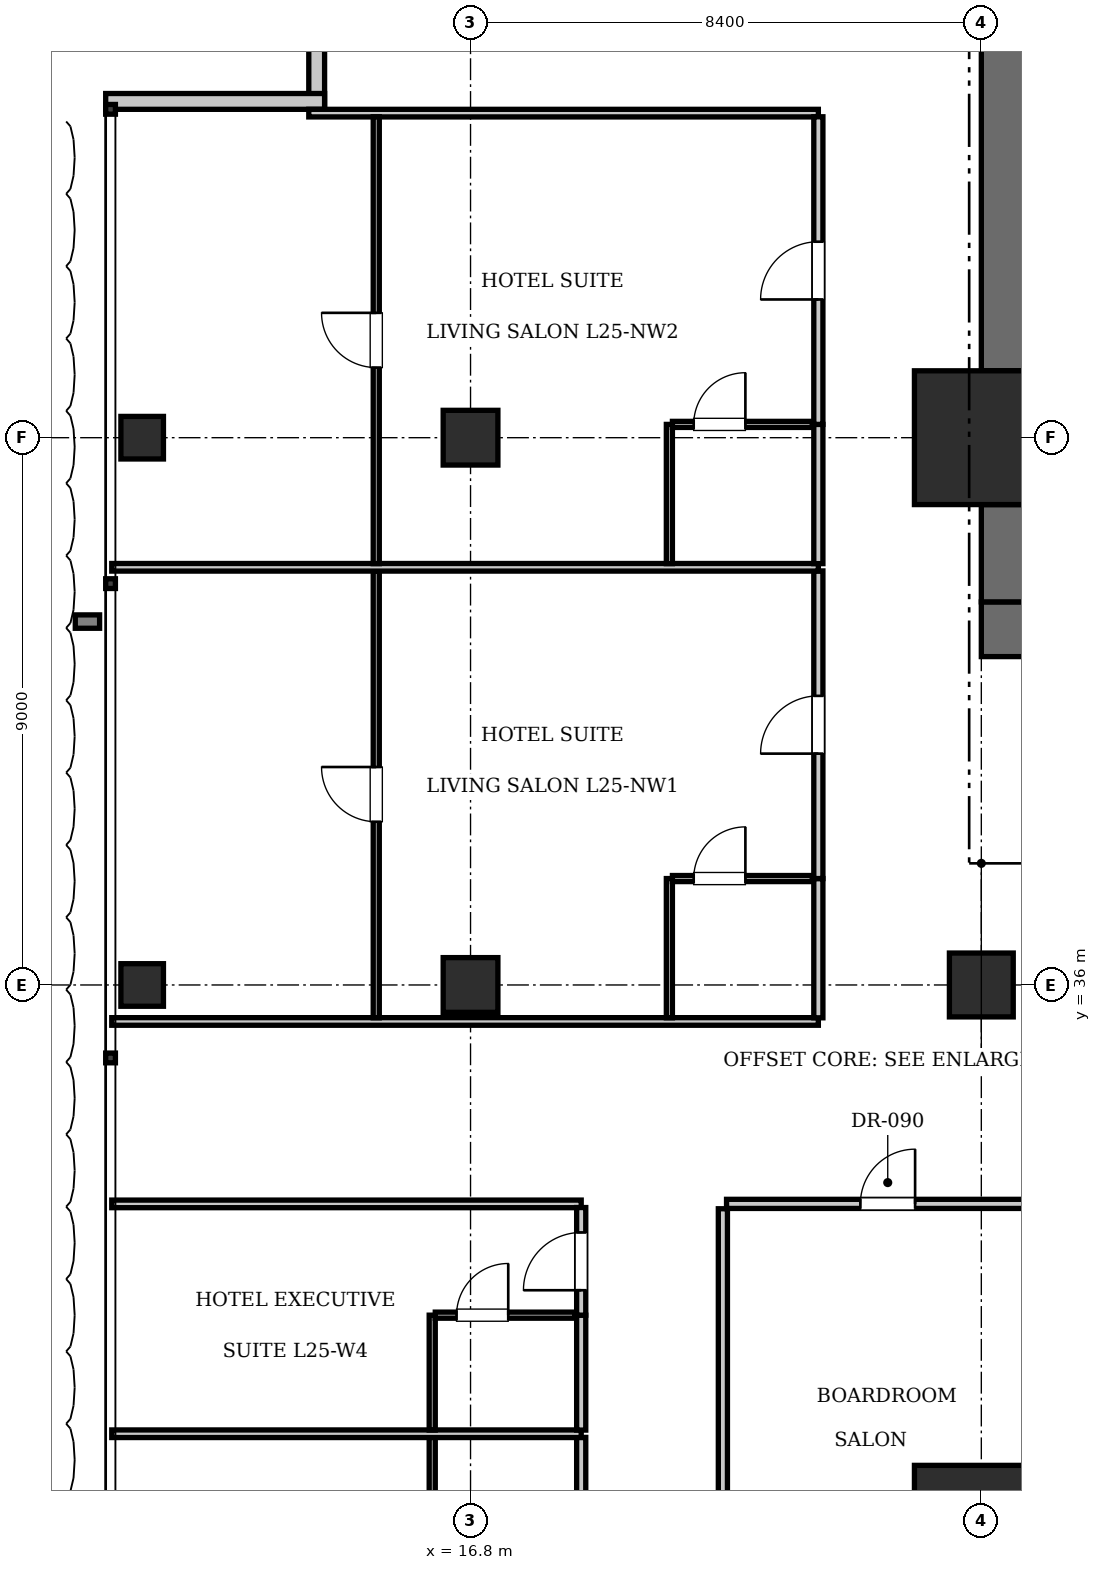
"""IFC4 building model, lengths in metres.
Left out: names, types, materials, properties, quantities, classifications, styles, units other than length and angle.
Written with IfcOpenShell. Run it as: python <this file> out.ifc"""

import sys

from ifc_helpers import new_model, si_unit, direction, frame, frame_2d, origin, origin_2d, place, context, subcontext, project, spatial, rectangle, i_section, extrude, element, fill, save


model = new_model("IFC4")
c1 = context("Model", 3, precision=1e-05, world=origin(), true_north=direction((0.0, 1.0)))
c2 = subcontext(c1, "Body", "Model", "MODEL_VIEW")
j1 = project(units=[si_unit("LENGTHUNIT", "METRE"), si_unit("PLANEANGLEUNIT", "RADIAN")], contexts=[c1])
p1 = place(None, origin())
s1 = spatial("IfcSite", under=j1, at=p1, CompositionType="ELEMENT")
p2 = place(p1, origin())
s2 = spatial("IfcBuilding", under=s1, at=p2, CompositionType="ELEMENT")
p3 = place(p2, frame((0.0, 0.0, 103.95)))
s3 = spatial("IfcBuildingStorey", under=s2, at=p3, CompositionType="ELEMENT", Elevation=103.95)
for number, where, z_axis, x_axis in (
    (1, (25.2, 27.0, 0.0), (0.0, 0.0, 1.0), (1.0, 0.0, 0.0)),
    (2, (25.2, 45.0, 0.0), (0.0, 0.0, 1.0), (1.0, 0.0, 0.0)),
):
    element("IfcColumn", number, at=place(p3, frame(where, z_axis=z_axis, x_axis=x_axis)), inside=s3, PredefinedType="COLUMN", context=c2, shape_type="SweptSolid", body=[
        extrude(rectangle(XDim=2.2, YDim=2.2, at=origin_2d()), origin(), (0.0, 0.0, 1.0), 3.85),
    ])
p4 = place(p3, frame((25.2, 41.85, 0.0), z_axis=(0.0, 0.0, 1.0), x_axis=(1.0, 0.0, 0.0)))
e3 = element("IfcWall", 3, at=p4, inside=s3, PredefinedType="SHEAR", context=c2, shape_type="SweptSolid", body=[
    extrude(rectangle(XDim=6.8, YDim=0.9, at=frame_2d((3.4, 0.0))), origin(), (0.0, 0.0, 1.0), 3.85),
])
p5 = place(p4, frame((1.65, 0.0, 0.0)))
e4 = element("IfcOpeningElement", 4, at=p5, cuts=e3, PredefinedType="OPENING", context=c2, shape_type="SweptSolid", body=[
    extrude(rectangle(XDim=1.15, YDim=2.15, at=frame_2d((0.575, 1.075))), frame((0.0, 0.46, 0.0), z_axis=(0.0, -1.0, 0.0), x_axis=(1.0, 0.0, 0.0)), (0.0, 0.0, 1.0), 0.92),
])
p6 = place(p4, frame((5.15, 0.0, 0.0)))
e5 = element("IfcOpeningElement", 5, at=p6, cuts=e3, PredefinedType="OPENING", context=c2, shape_type="SweptSolid", body=[
    extrude(rectangle(XDim=1.1, YDim=2.2, at=frame_2d((0.55, 1.1))), frame((0.0, 0.46, 0.0), z_axis=(0.0, -1.0, 0.0), x_axis=(1.0, 0.0, 0.0)), (0.0, 0.0, 1.0), 0.92),
])
p7 = place(p3, frame((25.65, 42.3, 0.0), z_axis=(0.0, 0.0, 1.0), x_axis=(0.0, 1.0, 0.0)))
e6 = element("IfcWall", 6, at=p7, inside=s3, PredefinedType="SHEAR", context=c2, shape_type="SweptSolid", body=[
    extrude(rectangle(XDim=1.6, YDim=0.9, at=frame_2d((0.8, 0.0))), origin(), (0.0, 0.0, 1.0), 3.85),
])
p8 = place(p3, frame((25.65, 46.1, 0.0), z_axis=(0.0, 0.0, 1.0), x_axis=(0.0, 1.0, 0.0)))
e7 = element("IfcWall", 7, at=p8, inside=s3, PredefinedType="SHEAR", context=c2, shape_type="SweptSolid", body=[
    extrude(rectangle(XDim=7.0, YDim=0.9, at=frame_2d((3.5, 0.0))), origin(), (0.0, 0.0, 1.0), 3.85),
])
p9 = place(p3, frame((25.2, 36.0, 0.0), z_axis=(0.0, 0.0, 1.0), x_axis=(1.0, 0.0, 0.0)))
e8 = element("IfcColumn", 8, at=p9, inside=s3, PredefinedType="COLUMN", context=c2, shape_type="SweptSolid", body=[
    extrude(rectangle(XDim=1.05, YDim=1.05, at=origin_2d()), origin(), (0.0, 0.0, 1.0), 3.85),
])
for number, where, z_axis, x_axis in (
    (9, (16.8, 36.0, 0.0), (0.0, 0.0, 1.0), (1.0, 0.0, 0.0)),
    (10, (16.8, 45.0, 0.0), (0.0, 0.0, 1.0), (1.0, 0.0, 0.0)),
):
    element("IfcColumn", number, at=place(p3, frame(where, z_axis=z_axis, x_axis=x_axis)), inside=s3, PredefinedType="COLUMN", context=c2, shape_type="SweptSolid", body=[
        extrude(rectangle(XDim=0.9, YDim=0.9, at=origin_2d()), origin(), (0.0, 0.0, 1.0), 3.85),
    ])
for number, where, z_axis, x_axis in (
    (11, (11.4, 36.0, 0.0), (0.0, 0.0, 1.0), (1.0, 0.0, 0.0)),
    (12, (11.4, 45.0, 0.0), (0.0, 0.0, 1.0), (1.0, 0.0, 0.0)),
):
    element("IfcColumn", number, at=place(p3, frame(where, z_axis=z_axis, x_axis=x_axis)), inside=s3, PredefinedType="COLUMN", context=c2, shape_type="SweptSolid", body=[
        extrude(i_section(OverallWidth=0.7, OverallDepth=0.7, WebThickness=0.028, FlangeThickness=0.044, at=origin_2d()), origin(), (0.0, 0.0, 1.0), 3.85),
    ])
p10 = place(p3, frame((14.27, 50.4, 0.0), z_axis=(0.0, 0.0, 1.0), x_axis=(0.0, 1.0, 0.0)))
e13 = element("IfcWall", 13, at=p10, inside=s3, PredefinedType="SOLIDWALL", context=c2, shape_type="SweptSolid", body=[
    extrude(rectangle(XDim=3.6, YDim=0.26, at=frame_2d((1.8, 0.0))), origin(), (0.0, 0.0, 1.0), 3.61),
])
p11 = place(p3, frame((10.8, 50.53, 0.0), z_axis=(0.0, 0.0, 1.0), x_axis=(1.0, 0.0, 0.0)))
e14 = element("IfcWall", 14, at=p11, inside=s3, PredefinedType="SOLIDWALL", context=c2, shape_type="SweptSolid", body=[
    extrude(rectangle(XDim=3.6, YDim=0.26, at=frame_2d((1.8, 0.0))), origin(), (0.0, 0.0, 1.0), 3.61),
])
p12 = place(p3, frame((20.95, 24.98, 0.0), z_axis=(0.0, 0.0, 1.0), x_axis=(0.0, 1.0, 0.0)))
e15 = element("IfcWall", 15, at=p12, inside=s3, PredefinedType="PARTITIONING", context=c2, shape_type="SweptSolid", body=[
    extrude(rectangle(XDim=7.34, YDim=0.15, at=frame_2d((3.67, 0.0))), origin(), (0.0, 0.0, 1.0), 3.293),
])
p13 = place(p3, frame((21.01, 32.4, 0.0), z_axis=(0.0, 0.0, 1.0), x_axis=(1.0, 0.0, 0.0)))
e16 = element("IfcWall", 16, at=p13, inside=s3, PredefinedType="PARTITIONING", context=c2, shape_type="SweptSolid", body=[
    extrude(rectangle(XDim=5.302, YDim=0.15, at=frame_2d((2.651, 0.0))), origin(), (0.0, 0.0, 1.0), 3.61),
])
p14 = place(p13, frame((2.201, 0.0, 0.0)))
e17 = element("IfcOpeningElement", 17, at=p14, cuts=e16, PredefinedType="OPENING", context=c2, shape_type="SweptSolid", body=[
    extrude(rectangle(XDim=0.9, YDim=2.1, at=frame_2d((0.45, 1.05))), frame((0.0, 0.085, 0.0), z_axis=(0.0, -1.0, 0.0), x_axis=(1.0, 0.0, 0.0)), (0.0, 0.0, 1.0), 0.17),
])
p15 = place(p3, frame((10.9, 32.4, 0.0), z_axis=(0.0, 0.0, 1.0), x_axis=(1.0, 0.0, 0.0)))
e18 = element("IfcWall", 18, at=p15, inside=s3, PredefinedType="PARTITIONING", context=c2, shape_type="SweptSolid", body=[
    extrude(rectangle(XDim=7.72, YDim=0.125, at=frame_2d((3.86, 0.0))), origin(), (0.0, 0.0, 1.0), 3.61),
])
p16 = place(p3, frame((18.62, 26.67, 0.0), z_axis=(0.0, 0.0, 1.0), x_axis=(0.0, 1.0, 0.0)))
e19 = element("IfcWall", 19, at=p16, inside=s3, PredefinedType="PARTITIONING", context=c2, shape_type="SweptSolid", body=[
    extrude(rectangle(XDim=1.89, YDim=0.15, at=frame_2d((0.945, 0.0))), origin(), (0.0, 0.0, 1.0), 3.61),
])
p17 = place(p3, frame((16.17, 26.67, 0.0), z_axis=(0.0, 0.0, 1.0), x_axis=(0.0, 1.0, 0.0)))
e20 = element("IfcWall", 20, at=p17, inside=s3, PredefinedType="PARTITIONING", context=c2, shape_type="SweptSolid", body=[
    extrude(rectangle(XDim=1.89, YDim=0.1, at=frame_2d((0.945, 0.0))), origin(), (0.0, 0.0, 1.0), 3.61),
])
p18 = place(p3, frame((10.9, 28.62, 0.0), z_axis=(0.0, 0.0, 1.0), x_axis=(1.0, 0.0, 0.0)))
e21 = element("IfcWall", 21, at=p18, inside=s3, PredefinedType="PARTITIONING", context=c2, shape_type="SweptSolid", body=[
    extrude(rectangle(XDim=7.72, YDim=0.125, at=frame_2d((3.86, 0.0))), origin(), (0.0, 0.0, 1.0), 3.61),
])
p19 = place(p3, frame((18.62, 28.68, 0.0), z_axis=(0.0, 0.0, 1.0), x_axis=(0.0, 1.0, 0.0)))
e22 = element("IfcWall", 22, at=p19, inside=s3, PredefinedType="PARTITIONING", context=c2, shape_type="SweptSolid", body=[
    extrude(rectangle(XDim=1.89, YDim=0.15, at=frame_2d((0.945, 0.0))), origin(), (0.0, 0.0, 1.0), 3.61),
])
p20 = place(p3, frame((18.62, 30.57, 0.0), z_axis=(0.0, 0.0, 1.0), x_axis=(0.0, 1.0, 0.0)))
e23 = element("IfcWall", 23, at=p20, inside=s3, PredefinedType="PARTITIONING", context=c2, shape_type="SweptSolid", body=[
    extrude(rectangle(XDim=1.77, YDim=0.15, at=frame_2d((0.885, 0.0))), origin(), (0.0, 0.0, 1.0), 3.61),
])
p21 = place(p20, frame((0.41, 0.0, 0.0)))
e24 = element("IfcOpeningElement", 24, at=p21, cuts=e23, PredefinedType="OPENING", context=c2, shape_type="SweptSolid", body=[
    extrude(rectangle(XDim=0.95, YDim=2.15, at=frame_2d((0.475, 1.075))), frame((0.0, 0.085, 0.0), z_axis=(0.0, -1.0, 0.0), x_axis=(1.0, 0.0, 0.0)), (0.0, 0.0, 1.0), 0.17),
])
p22 = place(p3, frame((16.17, 28.68, 0.0), z_axis=(0.0, 0.0, 1.0), x_axis=(0.0, 1.0, 0.0)))
e25 = element("IfcWall", 25, at=p22, inside=s3, PredefinedType="PARTITIONING", context=c2, shape_type="SweptSolid", body=[
    extrude(rectangle(XDim=1.89, YDim=0.1, at=frame_2d((0.945, 0.0))), origin(), (0.0, 0.0, 1.0), 3.61),
])
p23 = place(p3, frame((16.22, 30.57, 0.0), z_axis=(0.0, 0.0, 1.0), x_axis=(1.0, 0.0, 0.0)))
e26 = element("IfcWall", 26, at=p23, inside=s3, PredefinedType="PARTITIONING", context=c2, shape_type="SweptSolid", body=[
    extrude(rectangle(XDim=2.3, YDim=0.1, at=frame_2d((1.15, 0.0))), origin(), (0.0, 0.0, 1.0), 3.61),
])
p24 = place(p23, frame((0.35, 0.0, 0.0)))
e27 = element("IfcOpeningElement", 27, at=p24, cuts=e26, PredefinedType="OPENING", context=c2, shape_type="SweptSolid", body=[
    extrude(rectangle(XDim=0.85, YDim=2.1, at=frame_2d((0.425, 1.05))), frame((0.0, 0.06, 0.0), z_axis=(0.0, -1.0, 0.0), x_axis=(1.0, 0.0, 0.0)), (0.0, 0.0, 1.0), 0.12),
])
p25 = place(p3, frame((10.9, 35.4, 0.0), z_axis=(0.0, 0.0, 1.0), x_axis=(1.0, 0.0, 0.0)))
e28 = element("IfcWall", 28, at=p25, inside=s3, PredefinedType="PARTITIONING", context=c2, shape_type="SweptSolid", body=[
    extrude(rectangle(XDim=11.62, YDim=0.125, at=frame_2d((5.81, 0.0))), origin(), (0.0, 0.0, 1.0), 3.61),
])
p26 = place(p3, frame((14.14, 50.337, 0.0), z_axis=(0.0, 0.0, 1.0), x_axis=(1.0, 0.0, 0.0)))
e29 = element("IfcWall", 29, at=p26, inside=s3, PredefinedType="PARTITIONING", context=c2, shape_type="SweptSolid", body=[
    extrude(rectangle(XDim=8.38, YDim=0.125, at=frame_2d((4.19, 0.0))), origin(), (0.0, 0.0, 1.0), 3.61),
])
p27 = place(p3, frame((22.52, 35.46, 0.0), z_axis=(0.0, 0.0, 1.0), x_axis=(0.0, 1.0, 0.0)))
e30 = element("IfcWall", 30, at=p27, inside=s3, PredefinedType="PARTITIONING", context=c2, shape_type="SweptSolid", body=[
    extrude(rectangle(XDim=2.29, YDim=0.15, at=frame_2d((1.145, 0.0))), origin(), (0.0, 0.0, 1.0), 3.61),
])
p28 = place(p3, frame((22.52, 37.75, 0.0), z_axis=(0.0, 0.0, 1.0), x_axis=(0.0, 1.0, 0.0)))
e31 = element("IfcWall", 31, at=p28, inside=s3, PredefinedType="PARTITIONING", context=c2, shape_type="SweptSolid", body=[
    extrude(rectangle(XDim=5.059, YDim=0.15, at=frame_2d((2.529, 0.0))), origin(), (0.0, 0.0, 1.0), 3.61),
])
p29 = place(p28, frame((2.054, 0.0, 0.0)))
e32 = element("IfcOpeningElement", 32, at=p29, cuts=e31, PredefinedType="OPENING", context=c2, shape_type="SweptSolid", body=[
    extrude(rectangle(XDim=0.95, YDim=2.15, at=frame_2d((0.475, 1.075))), frame((0.0, 0.085, 0.0), z_axis=(0.0, -1.0, 0.0), x_axis=(1.0, 0.0, 0.0)), (0.0, 0.0, 1.0), 0.17),
])
p30 = place(p3, frame((20.07, 35.46, 0.0), z_axis=(0.0, 0.0, 1.0), x_axis=(0.0, 1.0, 0.0)))
e33 = element("IfcWall", 33, at=p30, inside=s3, PredefinedType="PARTITIONING", context=c2, shape_type="SweptSolid", body=[
    extrude(rectangle(XDim=2.29, YDim=0.1, at=frame_2d((1.145, 0.0))), origin(), (0.0, 0.0, 1.0), 3.61),
])
p31 = place(p3, frame((20.12, 37.75, 0.0), z_axis=(0.0, 0.0, 1.0), x_axis=(1.0, 0.0, 0.0)))
e34 = element("IfcWall", 34, at=p31, inside=s3, PredefinedType="PARTITIONING", context=c2, shape_type="SweptSolid", body=[
    extrude(rectangle(XDim=2.3, YDim=0.1, at=frame_2d((1.15, 0.0))), origin(), (0.0, 0.0, 1.0), 3.61),
])
p32 = place(p31, frame((0.35, 0.0, 0.0)))
e35 = element("IfcOpeningElement", 35, at=p32, cuts=e34, PredefinedType="OPENING", context=c2, shape_type="SweptSolid", body=[
    extrude(rectangle(XDim=0.85, YDim=2.1, at=frame_2d((0.425, 1.05))), frame((0.0, 0.06, 0.0), z_axis=(0.0, -1.0, 0.0), x_axis=(1.0, 0.0, 0.0)), (0.0, 0.0, 1.0), 0.12),
])
p33 = place(p3, frame((15.25, 35.46, 0.0), z_axis=(0.0, 0.0, 1.0), x_axis=(0.0, 1.0, 0.0)))
e36 = element("IfcWall", 36, at=p33, inside=s3, PredefinedType="PARTITIONING", context=c2, shape_type="SweptSolid", body=[
    extrude(rectangle(XDim=7.349, YDim=0.1, at=frame_2d((3.674, 0.0))), origin(), (0.0, 0.0, 1.0), 3.61),
])
p34 = place(p33, frame((3.224, 0.0, 0.0)))
e37 = element("IfcOpeningElement", 37, at=p34, cuts=e36, PredefinedType="OPENING", context=c2, shape_type="SweptSolid", body=[
    extrude(rectangle(XDim=0.9, YDim=2.1, at=frame_2d((0.45, 1.05))), frame((0.0, 0.06, 0.0), z_axis=(0.0, -1.0, 0.0), x_axis=(1.0, 0.0, 0.0)), (0.0, 0.0, 1.0), 0.12),
])
p35 = place(p3, frame((10.9, 42.869, 0.0), z_axis=(0.0, 0.0, 1.0), x_axis=(1.0, 0.0, 0.0)))
e38 = element("IfcWall", 38, at=p35, inside=s3, PredefinedType="PARTITIONING", context=c2, shape_type="SweptSolid", body=[
    extrude(rectangle(XDim=11.62, YDim=0.125, at=frame_2d((5.81, 0.0))), origin(), (0.0, 0.0, 1.0), 3.61),
])
p36 = place(p3, frame((22.52, 42.929, 0.0), z_axis=(0.0, 0.0, 1.0), x_axis=(0.0, 1.0, 0.0)))
e39 = element("IfcWall", 39, at=p36, inside=s3, PredefinedType="PARTITIONING", context=c2, shape_type="SweptSolid", body=[
    extrude(rectangle(XDim=2.29, YDim=0.15, at=frame_2d((1.145, 0.0))), origin(), (0.0, 0.0, 1.0), 3.61),
])
p37 = place(p3, frame((22.52, 45.219, 0.0), z_axis=(0.0, 0.0, 1.0), x_axis=(0.0, 1.0, 0.0)))
e40 = element("IfcWall", 40, at=p37, inside=s3, PredefinedType="PARTITIONING", context=c2, shape_type="SweptSolid", body=[
    extrude(rectangle(XDim=5.059, YDim=0.15, at=frame_2d((2.529, 0.0))), origin(), (0.0, 0.0, 1.0), 3.61),
])
p38 = place(p37, frame((2.054, 0.0, 0.0)))
e41 = element("IfcOpeningElement", 41, at=p38, cuts=e40, PredefinedType="OPENING", context=c2, shape_type="SweptSolid", body=[
    extrude(rectangle(XDim=0.95, YDim=2.15, at=frame_2d((0.475, 1.075))), frame((0.0, 0.085, 0.0), z_axis=(0.0, -1.0, 0.0), x_axis=(1.0, 0.0, 0.0)), (0.0, 0.0, 1.0), 0.17),
])
p39 = place(p3, frame((20.07, 42.929, 0.0), z_axis=(0.0, 0.0, 1.0), x_axis=(0.0, 1.0, 0.0)))
e42 = element("IfcWall", 42, at=p39, inside=s3, PredefinedType="PARTITIONING", context=c2, shape_type="SweptSolid", body=[
    extrude(rectangle(XDim=2.29, YDim=0.1, at=frame_2d((1.145, 0.0))), origin(), (0.0, 0.0, 1.0), 3.61),
])
p40 = place(p3, frame((20.12, 45.219, 0.0), z_axis=(0.0, 0.0, 1.0), x_axis=(1.0, 0.0, 0.0)))
e43 = element("IfcWall", 43, at=p40, inside=s3, PredefinedType="PARTITIONING", context=c2, shape_type="SweptSolid", body=[
    extrude(rectangle(XDim=2.3, YDim=0.1, at=frame_2d((1.15, 0.0))), origin(), (0.0, 0.0, 1.0), 3.61),
])
p41 = place(p40, frame((0.35, 0.0, 0.0)))
e44 = element("IfcOpeningElement", 44, at=p41, cuts=e43, PredefinedType="OPENING", context=c2, shape_type="SweptSolid", body=[
    extrude(rectangle(XDim=0.85, YDim=2.1, at=frame_2d((0.425, 1.05))), frame((0.0, 0.06, 0.0), z_axis=(0.0, -1.0, 0.0), x_axis=(1.0, 0.0, 0.0)), (0.0, 0.0, 1.0), 0.12),
])
p42 = place(p3, frame((15.25, 42.929, 0.0), z_axis=(0.0, 0.0, 1.0), x_axis=(0.0, 1.0, 0.0)))
e45 = element("IfcWall", 45, at=p42, inside=s3, PredefinedType="PARTITIONING", context=c2, shape_type="SweptSolid", body=[
    extrude(rectangle(XDim=7.349, YDim=0.1, at=frame_2d((3.674, 0.0))), origin(), (0.0, 0.0, 1.0), 3.61),
])
p43 = place(p42, frame((3.224, 0.0, 0.0)))
e46 = element("IfcOpeningElement", 46, at=p43, cuts=e45, PredefinedType="OPENING", context=c2, shape_type="SweptSolid", body=[
    extrude(rectangle(XDim=0.9, YDim=2.1, at=frame_2d((0.45, 1.05))), frame((0.0, 0.06, 0.0), z_axis=(0.0, -1.0, 0.0), x_axis=(1.0, 0.0, 0.0)), (0.0, 0.0, 1.0), 0.12),
])
p44 = place(p14, origin())
e47 = element("IfcDoor", 47, at=p44, inside=s3, OperationType="SINGLE_SWING_RIGHT", PredefinedType="DOOR", context=c2, shape_type="SweptSolid", body=[
    extrude(rectangle(XDim=0.9, YDim=2.1, at=frame_2d((0.45, 1.05))), frame((0.0, 0.025, 0.0), z_axis=(0.0, -1.0, 0.0), x_axis=(1.0, 0.0, 0.0)), (0.0, 0.0, 1.0), 0.05),
])
fill(e17, e47)
p45 = place(p24, origin())
e48 = element("IfcDoor", 48, at=p45, inside=s3, OperationType="SINGLE_SWING_RIGHT", PredefinedType="DOOR", context=c2, shape_type="SweptSolid", body=[
    extrude(rectangle(XDim=0.85, YDim=2.1, at=frame_2d((0.425, 1.05))), frame((0.0, 0.025, 0.0), z_axis=(0.0, -1.0, 0.0), x_axis=(1.0, 0.0, 0.0)), (0.0, 0.0, 1.0), 0.05),
])
fill(e27, e48)
p46 = place(p21, origin())
e49 = element("IfcDoor", 49, at=p46, inside=s3, OperationType="SINGLE_SWING_LEFT", PredefinedType="DOOR", context=c2, shape_type="SweptSolid", body=[
    extrude(rectangle(XDim=0.95, YDim=2.15, at=frame_2d((0.475, 1.075))), frame((0.0, 0.025, 0.0), z_axis=(0.0, -1.0, 0.0), x_axis=(1.0, 0.0, 0.0)), (0.0, 0.0, 1.0), 0.05),
])
fill(e24, e49)
p47 = place(p32, origin())
e50 = element("IfcDoor", 50, at=p47, inside=s3, OperationType="SINGLE_SWING_RIGHT", PredefinedType="DOOR", context=c2, shape_type="SweptSolid", body=[
    extrude(rectangle(XDim=0.85, YDim=2.1, at=frame_2d((0.425, 1.05))), frame((0.0, 0.025, 0.0), z_axis=(0.0, -1.0, 0.0), x_axis=(1.0, 0.0, 0.0)), (0.0, 0.0, 1.0), 0.05),
])
fill(e35, e50)
p48 = place(p29, origin())
e51 = element("IfcDoor", 51, at=p48, inside=s3, OperationType="SINGLE_SWING_LEFT", PredefinedType="DOOR", context=c2, shape_type="SweptSolid", body=[
    extrude(rectangle(XDim=0.95, YDim=2.15, at=frame_2d((0.475, 1.075))), frame((0.0, 0.025, 0.0), z_axis=(0.0, -1.0, 0.0), x_axis=(1.0, 0.0, 0.0)), (0.0, 0.0, 1.0), 0.05),
])
fill(e32, e51)
p49 = place(p34, origin())
e52 = element("IfcDoor", 52, at=p49, inside=s3, OperationType="SINGLE_SWING_RIGHT", PredefinedType="DOOR", context=c2, shape_type="SweptSolid", body=[
    extrude(rectangle(XDim=0.9, YDim=2.1, at=frame_2d((0.45, 1.05))), frame((0.0, 0.025, 0.0), z_axis=(0.0, -1.0, 0.0), x_axis=(1.0, 0.0, 0.0)), (0.0, 0.0, 1.0), 0.05),
])
fill(e37, e52)
p50 = place(p41, origin())
e53 = element("IfcDoor", 53, at=p50, inside=s3, OperationType="SINGLE_SWING_RIGHT", PredefinedType="DOOR", context=c2, shape_type="SweptSolid", body=[
    extrude(rectangle(XDim=0.85, YDim=2.1, at=frame_2d((0.425, 1.05))), frame((0.0, 0.025, 0.0), z_axis=(0.0, -1.0, 0.0), x_axis=(1.0, 0.0, 0.0)), (0.0, 0.0, 1.0), 0.05),
])
fill(e44, e53)
p51 = place(p38, origin())
e54 = element("IfcDoor", 54, at=p51, inside=s3, OperationType="SINGLE_SWING_LEFT", PredefinedType="DOOR", context=c2, shape_type="SweptSolid", body=[
    extrude(rectangle(XDim=0.95, YDim=2.15, at=frame_2d((0.475, 1.075))), frame((0.0, 0.025, 0.0), z_axis=(0.0, -1.0, 0.0), x_axis=(1.0, 0.0, 0.0)), (0.0, 0.0, 1.0), 0.05),
])
fill(e41, e54)
p52 = place(p43, origin())
e55 = element("IfcDoor", 55, at=p52, inside=s3, OperationType="SINGLE_SWING_RIGHT", PredefinedType="DOOR", context=c2, shape_type="SweptSolid", body=[
    extrude(rectangle(XDim=0.9, YDim=2.1, at=frame_2d((0.45, 1.05))), frame((0.0, 0.025, 0.0), z_axis=(0.0, -1.0, 0.0), x_axis=(1.0, 0.0, 0.0)), (0.0, 0.0, 1.0), 0.05),
])
fill(e46, e55)
save(model, sys.argv[1])
